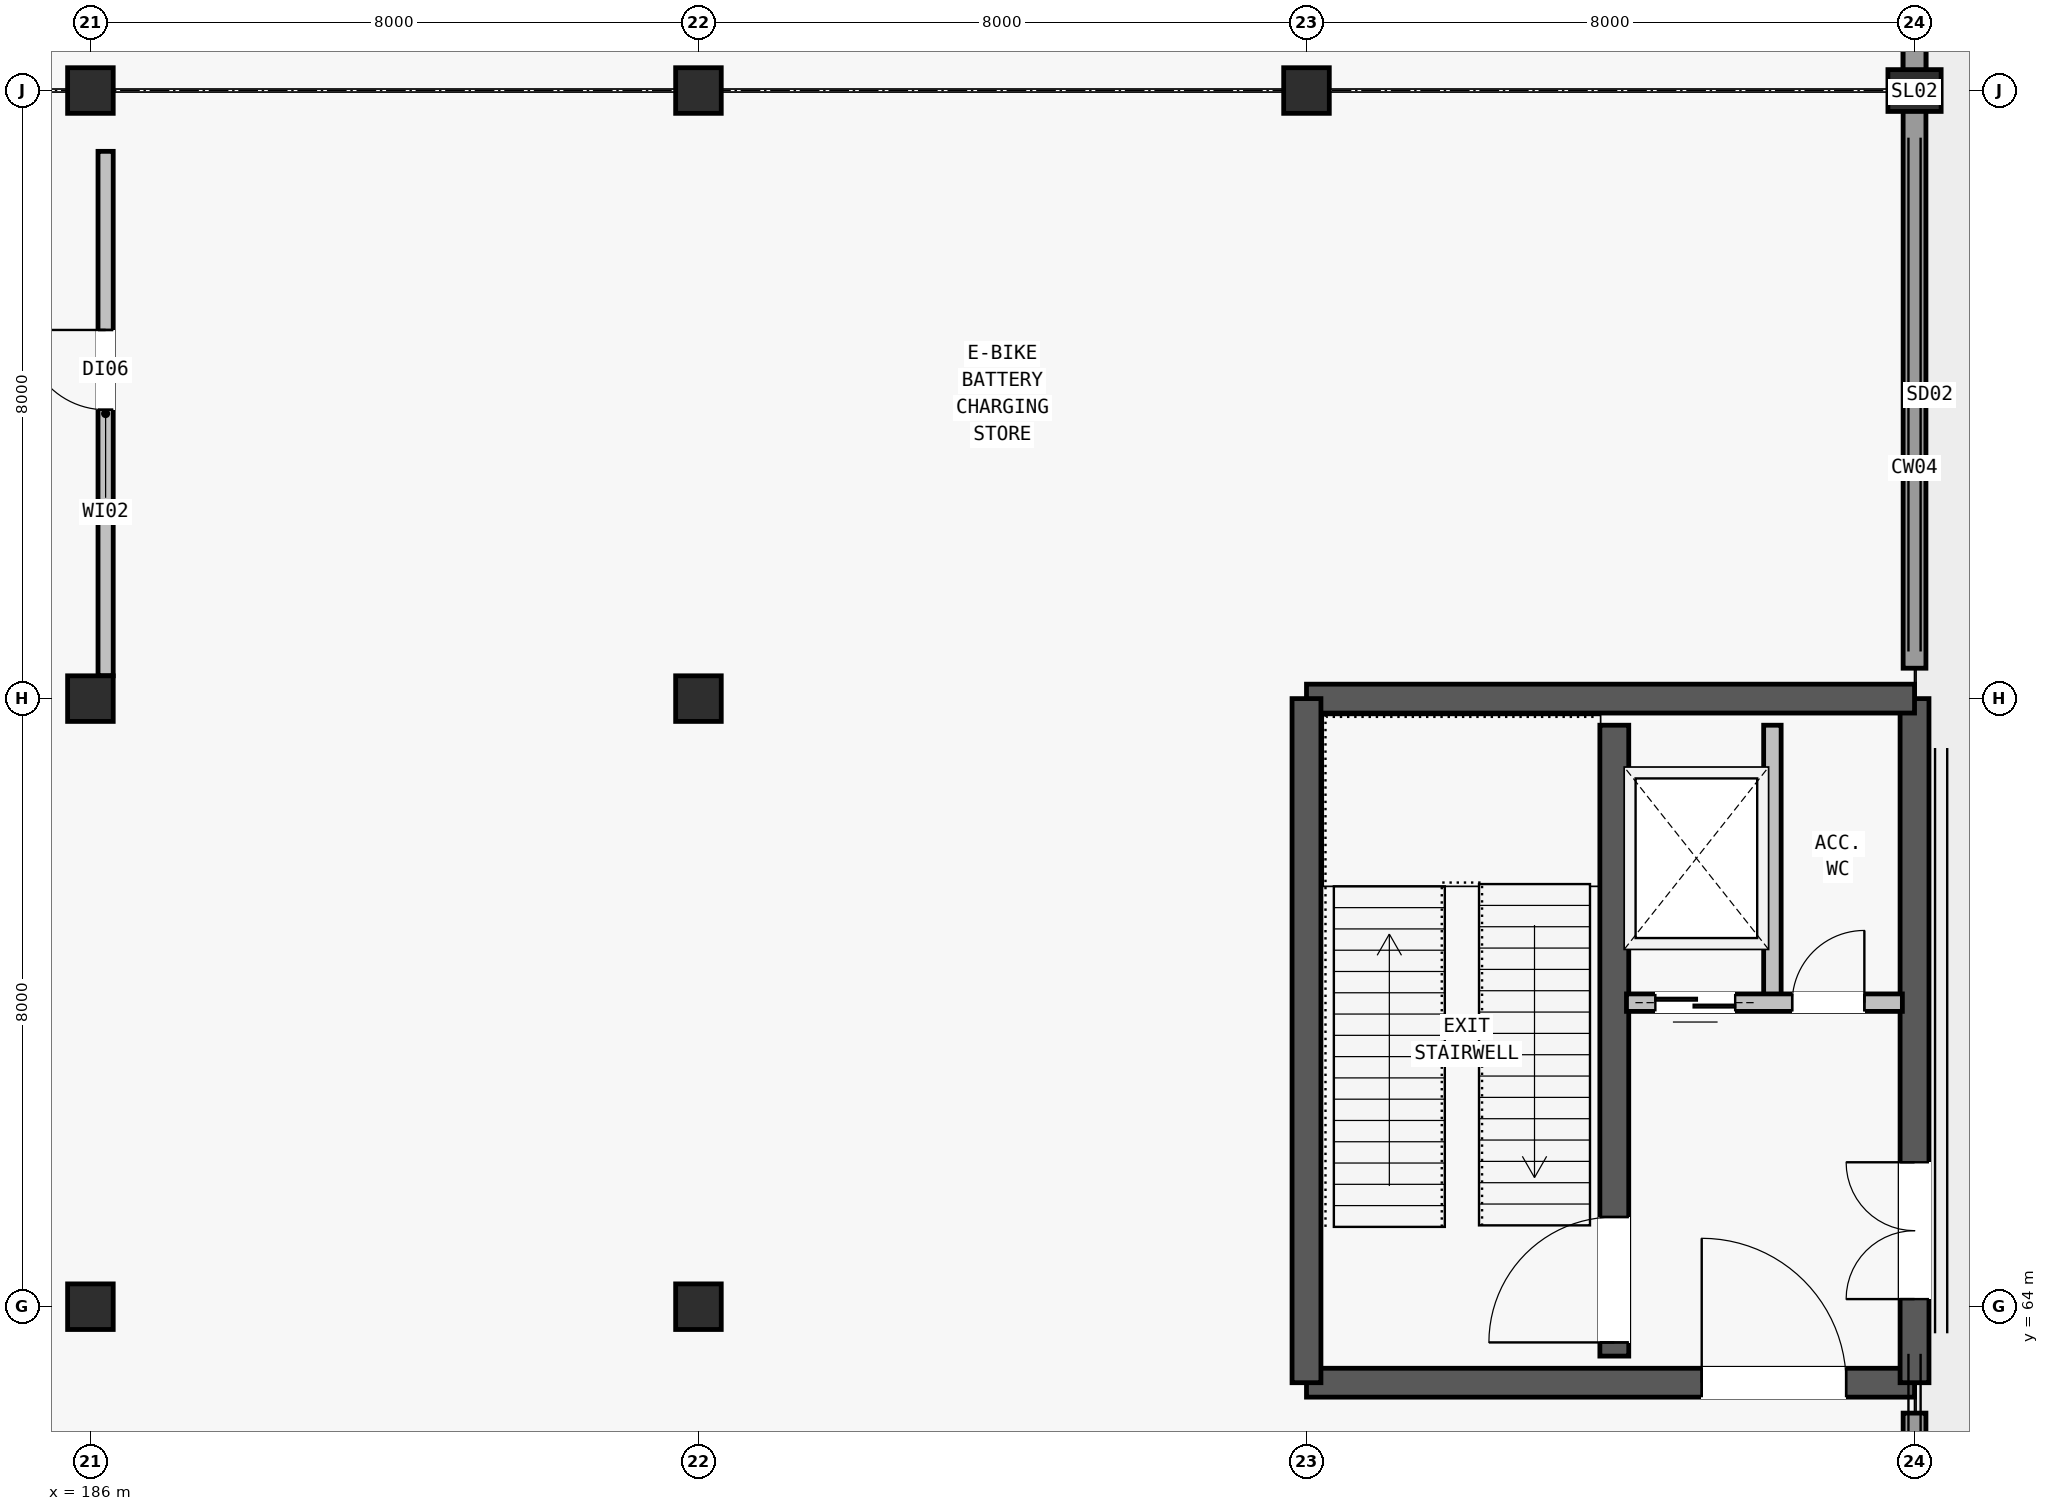
"""IFC4 building model, lengths in metres.
Left out: names, types, materials, properties, quantities, classifications, styles, units other than length and angle.
Written with IfcOpenShell. Run it as: python <this file> out.ifc"""

import sys

from ifc_helpers import new_model, si_unit, direction, frame, frame_2d, origin, origin_2d, place, context, subcontext, project, spatial, rectangle, extrude, element, fill, save


model = new_model("IFC4")
c1 = context("Model", 3, precision=1e-05, world=origin(), true_north=direction((0.0, 1.0)))
c2 = subcontext(c1, "Body", "Model", "MODEL_VIEW")
j1 = project(units=[si_unit("LENGTHUNIT", "METRE"), si_unit("PLANEANGLEUNIT", "RADIAN")], contexts=[c1])
p1 = place(None, origin())
s1 = spatial("IfcSite", under=j1, at=p1, CompositionType="ELEMENT")
p2 = place(p1, origin())
s2 = spatial("IfcBuilding", under=s1, at=p2, CompositionType="ELEMENT")
p3 = place(p2, origin())
s3 = spatial("IfcBuildingStorey", under=s2, at=p3, CompositionType="ELEMENT", Elevation=0.0)
for number, where, z_axis, x_axis in (
    (1, (186.0, 64.0, -0.9), (0.0, 0.0, 1.0), (1.0, 0.0, 0.0)),
    (2, (186.0, 72.0, -0.9), (0.0, 0.0, 1.0), (1.0, 0.0, 0.0)),
    (3, (186.0, 80.0, -0.9), (0.0, 0.0, 1.0), (1.0, 0.0, 0.0)),
    (4, (194.0, 64.0, -0.9), (0.0, 0.0, 1.0), (1.0, 0.0, 0.0)),
    (5, (194.0, 72.0, -0.9), (0.0, 0.0, 1.0), (1.0, 0.0, 0.0)),
    (6, (194.0, 80.0, -0.9), (0.0, 0.0, 1.0), (1.0, 0.0, 0.0)),
    (7, (202.0, 80.0, -0.9), (0.0, 0.0, 1.0), (1.0, 0.0, 0.0)),
):
    element("IfcColumn", number, at=place(p3, frame(where, z_axis=z_axis, x_axis=x_axis)), inside=s3, PredefinedType="COLUMN", context=c2, shape_type="SweptSolid", body=[
        extrude(rectangle(XDim=0.6, YDim=0.6, at=origin_2d()), origin(), (0.0, 0.0, 1.0), 6.5),
    ])
p4 = place(p3, frame((210.0, 80.0, -0.9), z_axis=(0.0, 0.0, 1.0), x_axis=(1.0, 0.0, 0.0)))
e8 = element("IfcColumn", 8, at=p4, inside=s3, PredefinedType="COLUMN", context=c2, shape_type="SweptSolid", body=[
    extrude(rectangle(XDim=0.7, YDim=0.55, at=origin_2d()), origin(), (0.0, 0.0, 1.0), 6.5),
])
p5 = place(p3, frame((210.0, 22.0, -0.9), z_axis=(0.0, 0.0, 1.0), x_axis=(0.0, 1.0, 0.0)))
e9 = element("IfcWall", 9, at=p5, inside=s3, PredefinedType="STANDARD", context=c2, shape_type="SweptSolid", body=[
    extrude(rectangle(XDim=40.6, YDim=0.3, at=frame_2d((20.3, 0.0))), origin(), (0.0, 0.0, 1.0), 0.9),
])
p6 = place(p3, frame((210.0, 72.4, -0.9), z_axis=(0.0, 0.0, 1.0), x_axis=(0.0, 1.0, 0.0)))
e10 = element("IfcWall", 10, at=p6, inside=s3, PredefinedType="STANDARD", context=c2, shape_type="SweptSolid", body=[
    extrude(rectangle(XDim=40.2, YDim=0.3, at=frame_2d((20.1, 0.0))), origin(), (0.0, 0.0, 1.0), 0.9),
])
p7 = place(p3, frame((210.0, 80.255, 0.0), z_axis=(0.0, 0.0, 1.0), x_axis=(0.0, 1.0, 0.0)))
e11 = element("IfcWall", 11, at=p7, inside=s3, PredefinedType="STANDARD", context=c2, shape_type="SweptSolid", body=[
    extrude(rectangle(XDim=7.36, YDim=0.3, at=frame_2d((3.68, 0.0))), origin(), (0.0, 0.0, 1.0), 4.2),
])
p8 = place(p7, frame((2.425, 0.0, 0.0)))
e12 = element("IfcOpeningElement", 12, at=p8, cuts=e11, PredefinedType="OPENING", context=c2, shape_type="SweptSolid", body=[
    extrude(rectangle(XDim=2.0, YDim=2.3, at=frame_2d((1.0, 1.15))), frame((0.0, 0.16, 0.0), z_axis=(0.0, -1.0, 0.0), x_axis=(1.0, 0.0, 0.0)), (0.0, 0.0, 1.0), 0.32),
])
p9 = place(p3, frame((202.0, 63.0, -0.9), z_axis=(0.0, 0.0, 1.0), x_axis=(1.0, 0.0, 0.0)))
e13 = element("IfcWall", 13, at=p9, inside=s3, PredefinedType="SHEAR", context=c2, shape_type="SweptSolid", body=[
    extrude(rectangle(XDim=8.0, YDim=0.38, at=frame_2d((4.0, 0.0))), origin(), (0.0, 0.0, 1.0), 6.22),
])
p10 = place(p9, frame((5.2, 0.0, 0.9)))
e14 = element("IfcOpeningElement", 14, at=p10, cuts=e13, PredefinedType="OPENING", context=c2, shape_type="SweptSolid", body=[
    extrude(rectangle(XDim=1.9, YDim=2.3, at=frame_2d((0.95, 1.15))), frame((0.0, 0.2, 0.0), z_axis=(0.0, -1.0, 0.0), x_axis=(1.0, 0.0, 0.0)), (0.0, 0.0, 1.0), 0.4),
])
p11 = place(p3, frame((210.0, 63.0, -0.9), z_axis=(0.0, 0.0, 1.0), x_axis=(0.0, 1.0, 0.0)))
e15 = element("IfcWall", 15, at=p11, inside=s3, PredefinedType="SHEAR", context=c2, shape_type="SweptSolid", body=[
    extrude(rectangle(XDim=9.0, YDim=0.38, at=frame_2d((4.5, 0.0))), origin(), (0.0, 0.0, 1.0), 6.22),
])
p12 = place(p11, frame((1.1, 0.0, 0.9)))
e16 = element("IfcOpeningElement", 16, at=p12, cuts=e15, PredefinedType="OPENING", context=c2, shape_type="SweptSolid", body=[
    extrude(rectangle(XDim=1.8, YDim=2.25, at=frame_2d((0.9, 1.125))), frame((0.0, 0.2, 0.0), z_axis=(0.0, -1.0, 0.0), x_axis=(1.0, 0.0, 0.0)), (0.0, 0.0, 1.0), 0.4),
])
p13 = place(p3, frame((210.0, 72.0, -0.9), z_axis=(0.0, 0.0, 1.0), x_axis=(-1.0, 0.0, 0.0)))
e17 = element("IfcWall", 17, at=p13, inside=s3, PredefinedType="SHEAR", context=c2, shape_type="SweptSolid", body=[
    extrude(rectangle(XDim=8.0, YDim=0.38, at=frame_2d((4.0, 0.0))), origin(), (0.0, 0.0, 1.0), 6.22),
])
p14 = place(p3, frame((202.0, 72.0, -0.9), z_axis=(0.0, 0.0, 1.0), x_axis=(0.0, -1.0, 0.0)))
e18 = element("IfcWall", 18, at=p14, inside=s3, PredefinedType="SHEAR", context=c2, shape_type="SweptSolid", body=[
    extrude(rectangle(XDim=9.0, YDim=0.38, at=frame_2d((4.5, 0.0))), origin(), (0.0, 0.0, 1.0), 6.22),
])
p15 = place(p3, frame((206.05, 63.35, -0.9), z_axis=(0.0, 0.0, 1.0), x_axis=(0.0, 1.0, 0.0)))
e19 = element("IfcWall", 19, at=p15, inside=s3, PredefinedType="SHEAR", context=c2, shape_type="SweptSolid", body=[
    extrude(rectangle(XDim=8.3, YDim=0.38, at=frame_2d((4.15, 0.0))), origin(), (0.0, 0.0, 1.0), 6.22),
])
p16 = place(p15, frame((0.18, 0.0, 0.9)))
e20 = element("IfcOpeningElement", 20, at=p16, cuts=e19, PredefinedType="OPENING", context=c2, shape_type="SweptSolid", body=[
    extrude(rectangle(XDim=1.65, YDim=2.2, at=frame_2d((0.825, 1.1))), frame((0.0, 0.2, 0.0), z_axis=(0.0, -1.0, 0.0), x_axis=(1.0, 0.0, 0.0)), (0.0, 0.0, 1.0), 0.4),
])
p17 = place(p3, frame((208.13, 68.0, 0.0), z_axis=(0.0, 0.0, 1.0), x_axis=(0.0, 1.0, 0.0)))
e21 = element("IfcWall", 21, at=p17, inside=s3, PredefinedType="PARTITIONING", context=c2, shape_type="SweptSolid", body=[
    extrude(rectangle(XDim=3.65, YDim=0.23, at=frame_2d((1.825, 0.0))), origin(), (0.0, 0.0, 1.0), 4.2),
])
p18 = place(p3, frame((206.21, 68.0, 0.0), z_axis=(0.0, 0.0, 1.0), x_axis=(1.0, 0.0, 0.0)))
e22 = element("IfcWall", 22, at=p18, inside=s3, PredefinedType="PARTITIONING", context=c2, shape_type="SweptSolid", body=[
    extrude(rectangle(XDim=3.63, YDim=0.23, at=frame_2d((1.815, 0.0))), origin(), (0.0, 0.0, 1.0), 4.2),
])
p19 = place(p18, frame((0.38, 0.0, 0.0)))
e23 = element("IfcOpeningElement", 23, at=p19, cuts=e22, PredefinedType="OPENING", context=c2, shape_type="SweptSolid", body=[
    extrude(rectangle(XDim=1.05, YDim=2.15, at=frame_2d((0.525, 1.075))), frame((0.0, 0.125, 0.0), z_axis=(0.0, -1.0, 0.0), x_axis=(1.0, 0.0, 0.0)), (0.0, 0.0, 1.0), 0.25),
])
p20 = place(p18, frame((2.18, 0.0, 0.0)))
e24 = element("IfcOpeningElement", 24, at=p20, cuts=e22, PredefinedType="OPENING", context=c2, shape_type="SweptSolid", body=[
    extrude(rectangle(XDim=0.95, YDim=2.1, at=frame_2d((0.475, 1.05))), frame((0.0, 0.125, 0.0), z_axis=(0.0, -1.0, 0.0), x_axis=(1.0, 0.0, 0.0)), (0.0, 0.0, 1.0), 0.25),
])
p21 = place(p3, frame((186.2, 72.3, 0.0), z_axis=(0.0, 0.0, 1.0), x_axis=(0.0, 1.0, 0.0)))
e25 = element("IfcWall", 25, at=p21, inside=s3, PredefinedType="PARTITIONING", context=c2, shape_type="SweptSolid", body=[
    extrude(rectangle(XDim=6.9, YDim=0.2, at=frame_2d((3.45, 0.0))), origin(), (0.0, 0.0, 1.0), 4.2),
])
p22 = place(p21, frame((3.5, 0.0, 0.0)))
e26 = element("IfcOpeningElement", 26, at=p22, cuts=e25, PredefinedType="OPENING", context=c2, shape_type="SweptSolid", body=[
    extrude(rectangle(XDim=1.05, YDim=2.15, at=frame_2d((0.525, 1.075))), frame((0.0, 0.11, 0.0), z_axis=(0.0, -1.0, 0.0), x_axis=(1.0, 0.0, 0.0)), (0.0, 0.0, 1.0), 0.22),
])
p23 = place(p10, origin())
e27 = element("IfcDoor", 27, at=p23, inside=s3, OperationType="SINGLE_SWING_LEFT", PredefinedType="DOOR", context=c2, shape_type="SweptSolid", body=[
    extrude(rectangle(XDim=1.9, YDim=2.3, at=frame_2d((0.95, 1.15))), frame((0.0, 0.025, 0.0), z_axis=(0.0, -1.0, 0.0), x_axis=(1.0, 0.0, 0.0)), (0.0, 0.0, 1.0), 0.05),
])
fill(e14, e27)
p24 = place(p12, origin())
e28 = element("IfcDoor", 28, at=p24, inside=s3, OperationType="DOUBLE_SWING_LEFT", PredefinedType="DOOR", context=c2, shape_type="SweptSolid", body=[
    extrude(rectangle(XDim=1.8, YDim=2.25, at=frame_2d((0.9, 1.125))), frame((0.0, 0.025, 0.0), z_axis=(0.0, -1.0, 0.0), x_axis=(1.0, 0.0, 0.0)), (0.0, 0.0, 1.0), 0.05),
])
fill(e16, e28)
p25 = place(p16, origin())
e29 = element("IfcDoor", 29, at=p25, inside=s3, OperationType="SINGLE_SWING_LEFT", PredefinedType="DOOR", context=c2, shape_type="SweptSolid", body=[
    extrude(rectangle(XDim=1.65, YDim=2.2, at=frame_2d((0.825, 1.1))), frame((0.0, 0.025, 0.0), z_axis=(0.0, -1.0, 0.0), x_axis=(1.0, 0.0, 0.0)), (0.0, 0.0, 1.0), 0.05),
])
fill(e20, e29)
p26 = place(p19, origin())
e30 = element("IfcDoor", 30, at=p26, inside=s3, OperationType="SLIDING_TO_LEFT", PredefinedType="DOOR", context=c2, shape_type="SweptSolid", body=[
    extrude(rectangle(XDim=1.05, YDim=2.15, at=frame_2d((0.525, 1.075))), frame((0.0, 0.025, 0.0), z_axis=(0.0, -1.0, 0.0), x_axis=(1.0, 0.0, 0.0)), (0.0, 0.0, 1.0), 0.05),
])
fill(e23, e30)
p27 = place(p20, origin())
e31 = element("IfcDoor", 31, at=p27, inside=s3, OperationType="SINGLE_SWING_RIGHT", PredefinedType="DOOR", context=c2, shape_type="SweptSolid", body=[
    extrude(rectangle(XDim=0.95, YDim=2.1, at=frame_2d((0.475, 1.05))), frame((0.0, 0.025, 0.0), z_axis=(0.0, -1.0, 0.0), x_axis=(1.0, 0.0, 0.0)), (0.0, 0.0, 1.0), 0.05),
])
fill(e24, e31)
p28 = place(p22, origin())
e32 = element("IfcDoor", 32, at=p28, inside=s3, OperationType="SINGLE_SWING_RIGHT", PredefinedType="DOOR", context=c2, shape_type="SweptSolid", body=[
    extrude(rectangle(XDim=1.05, YDim=2.15, at=frame_2d((0.525, 1.075))), frame((0.0, 0.025, 0.0), z_axis=(0.0, -1.0, 0.0), x_axis=(1.0, 0.0, 0.0)), (0.0, 0.0, 1.0), 0.05),
])
fill(e26, e32)
save(model, sys.argv[1])
